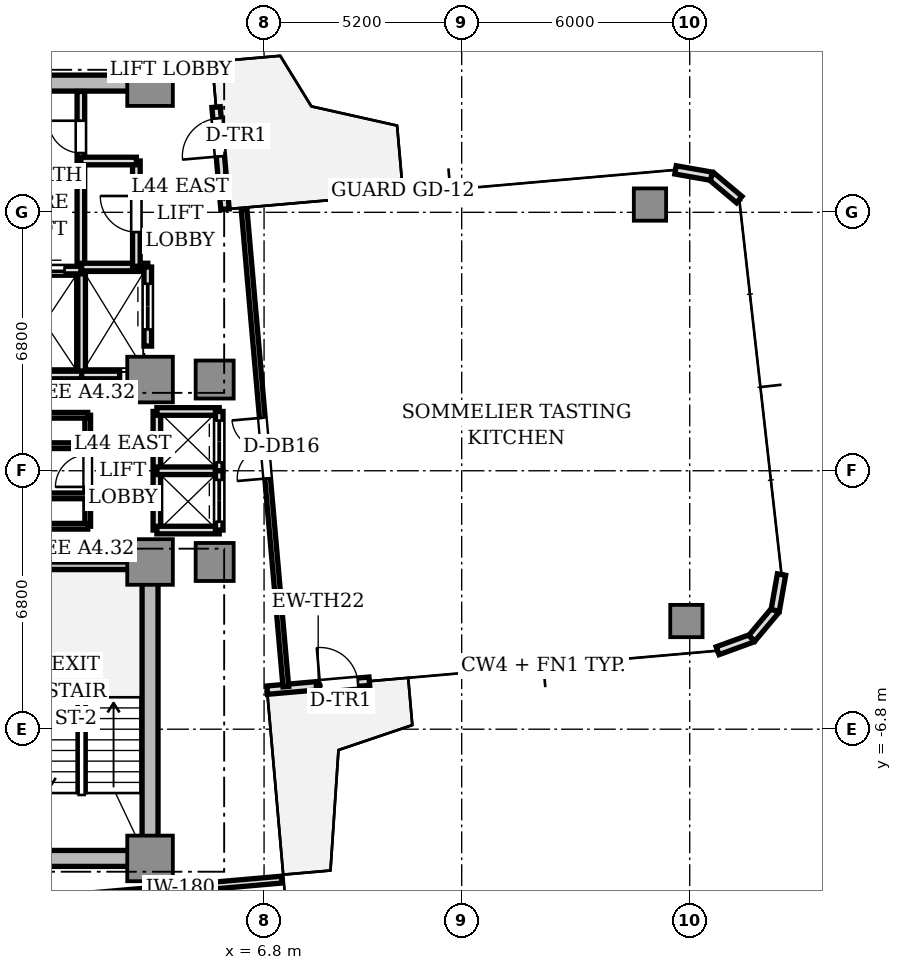
"""IFC4 building model, lengths in metres.
Left out: names, types, materials, properties, quantities, classifications, styles, units other than length and angle.
Written with IfcOpenShell. Run it as: python <this file> out.ifc"""

import sys

from ifc_helpers import new_model, si_unit, direction, frame, frame_2d, origin, origin_2d, place, context, subcontext, project, spatial, rectangle, extrude, source, transform, mapped, element, fill, save


model = new_model("IFC4")
c1 = context("Model", 3, precision=1e-05, world=origin(), true_north=direction((0.0, 1.0)))
c2 = subcontext(c1, "Body", "Model", "MODEL_VIEW")
j1 = project(units=[si_unit("LENGTHUNIT", "METRE"), si_unit("PLANEANGLEUNIT", "RADIAN")], contexts=[c1])
p1 = place(None, origin())
s1 = spatial("IfcSite", under=j1, at=p1, CompositionType="ELEMENT")
p2 = place(p1, origin())
s2 = spatial("IfcBuilding", under=s1, at=p2, CompositionType="ELEMENT")
p3 = place(p2, frame((0.0, 0.0, 160.65)))
s3 = spatial("IfcBuildingStorey", under=s2, at=p3, CompositionType="ELEMENT", Elevation=160.65)
for number, where, z_axis, x_axis in (
    (1, (-3.55, 10.2, 0.0), (0.0, 0.0, 1.0), (1.0, 0.0, 0.0)),
    (2, (-3.55, -10.2, 0.0), (0.0, 0.0, 1.0), (1.0, 0.0, 0.0)),
):
    element("IfcWall", number, at=place(p3, frame(where, z_axis=z_axis, x_axis=x_axis)), inside=s3, PredefinedType="SHEAR", context=c2, shape_type="SweptSolid", body=[
        extrude(rectangle(XDim=7.1, YDim=0.42, at=frame_2d((3.55, 0.0))), origin(), (0.0, 0.0, 1.0), 3.11),
    ])
p4 = place(p3, frame((3.8, -9.75, 0.0), z_axis=(0.0, 0.0, 1.0), x_axis=(0.0, 1.0, 0.0)))
e3 = element("IfcWall", 3, at=p4, inside=s3, PredefinedType="SHEAR", context=c2, shape_type="SweptSolid", body=[
    extrude(rectangle(XDim=6.9, YDim=0.42, at=frame_2d((3.45, 0.0))), origin(), (0.0, 0.0, 1.0), 3.11),
])
m1 = source(origin(), c2, "Body", "SweptSolid", [
    extrude(rectangle(XDim=1.2, YDim=1.2, at=origin_2d()), origin(), (0.0, 0.0, 1.0), 3.11),
])
for number, where, z_axis, x_axis in (
    (4, (3.8, 2.4, 0.0), (0.0, 0.0, 1.0), (1.0, 0.0, 0.0)),
    (5, (3.8, 10.2, 0.0), (0.0, 0.0, 1.0), (1.0, 0.0, 0.0)),
    (6, (3.8, -2.4, 0.0), (0.0, 0.0, 1.0), (1.0, 0.0, 0.0)),
    (7, (3.8, -10.2, 0.0), (0.0, 0.0, 1.0), (1.0, 0.0, 0.0)),
):
    element("IfcColumn", number, at=place(p3, frame(where, z_axis=z_axis, x_axis=x_axis)), inside=s3, PredefinedType="COLUMN", context=c2, shape_type="MappedRepresentation", body=[
        mapped(m1, transform((0.0, 0.0, 0.0), scale=1.0)),
    ])
m2 = source(origin(), c2, "Body", "SweptSolid", [
    extrude(rectangle(XDim=1.0, YDim=1.0, at=origin_2d()), origin(), (0.0, 0.0, 1.0), 3.11),
])
for number, where, z_axis, x_axis in (
    (8, (5.5, 2.4, 0.0), (0.0, 0.0, 1.0), (1.0, 0.0, 0.0)),
    (9, (5.5, -2.4, 0.0), (0.0, 0.0, 1.0), (1.0, 0.0, 0.0)),
):
    element("IfcColumn", number, at=place(p3, frame(where, z_axis=z_axis, x_axis=x_axis)), inside=s3, PredefinedType="COLUMN", context=c2, shape_type="MappedRepresentation", body=[
        mapped(m2, transform((0.0, 0.0, 0.0), scale=1.0)),
    ])
m3 = source(origin(), c2, "Body", "SweptSolid", [
    extrude(rectangle(XDim=0.85, YDim=0.85, at=origin_2d()), origin(), (0.0, 0.0, 1.0), 3.11),
])
for number, where, z_axis, x_axis in (
    (10, (17.913, -3.954, 0.0), (0.0, 0.0, 1.0), (1.0, 0.0, 0.0)),
    (11, (16.954, 7.004, 0.0), (0.0, 0.0, 1.0), (1.0, 0.0, 0.0)),
):
    element("IfcColumn", number, at=place(p3, frame(where, z_axis=z_axis, x_axis=x_axis)), inside=s3, PredefinedType="COLUMN", context=c2, shape_type="MappedRepresentation", body=[
        mapped(m3, transform((0.0, 0.0, 0.0), scale=1.0)),
    ])
p5 = place(p3, frame((6.879, -5.772, 0.0), z_axis=(0.0, 0.0, 1.0), x_axis=(0.996193619346, 0.087168071984, 0.0)))
e12 = element("IfcWall", 12, at=p5, inside=s3, PredefinedType="STANDARD", context=c2, shape_type="SweptSolid", body=[
    extrude(rectangle(XDim=2.7, YDim=0.22, at=frame_2d((1.35, 0.0))), origin(), (0.0, 0.0, 1.0), 3.11),
])
p6 = place(p5, frame((1.4, 0.0, 0.0)))
e13 = element("IfcOpeningElement", 13, at=p6, cuts=e12, PredefinedType="OPENING", context=c2, shape_type="SweptSolid", body=[
    extrude(rectangle(XDim=1.0, YDim=2.2, at=frame_2d((0.5, 1.1))), frame((0.0, 0.12, 0.0), z_axis=(0.0, -1.0, 0.0), x_axis=(1.0, 0.0, 0.0)), (0.0, 0.0, 1.0), 0.24),
])
p7 = place(p3, frame((18.734, -4.735, 0.0), z_axis=(0.0, 0.0, 1.0), x_axis=(0.939741306239, 0.34188635151, 0.0)))
e14 = element("IfcWall", 14, at=p7, inside=s3, PredefinedType="STANDARD", context=c2, shape_type="SweptSolid", body=[
    extrude(rectangle(XDim=0.958, YDim=0.22, at=frame_2d((0.479, 0.0))), origin(), (0.0, 0.0, 1.0), 3.11),
])
for number, where, z_axis, x_axis in (
    (15, (19.634, -4.408, 0.0), (0.0, 0.0, 1.0), (0.643, 0.766, 0.0)),
    (16, (20.25, -3.674, 0.0), (0.0, 0.0, 1.0), (0.174, 0.985, 0.0)),
):
    element("IfcWall", number, at=place(p3, frame(where, z_axis=z_axis, x_axis=x_axis)), inside=s3, PredefinedType="STANDARD", context=c2, shape_type="SweptSolid", body=[
        extrude(rectangle(XDim=0.958, YDim=0.22, at=frame_2d((0.479, 0.0))), origin(), (0.0, 0.0, 1.0), 3.11),
    ])
p8 = place(p3, frame((19.304, 7.135, 0.0), z_axis=(0.0, 0.0, 1.0), x_axis=(-0.766001159887, 0.642839189107, 0.0)))
e17 = element("IfcWall", 17, at=p8, inside=s3, PredefinedType="STANDARD", context=c2, shape_type="SweptSolid", body=[
    extrude(rectangle(XDim=0.958, YDim=0.22, at=frame_2d((0.479, 0.0))), origin(), (0.0, 0.0, 1.0), 3.11),
])
p9 = place(p3, frame((18.57, 7.75, 0.0), z_axis=(0.0, 0.0, 1.0), x_axis=(-0.984770724397, 0.173858046606, 0.0)))
e18 = element("IfcWall", 18, at=p9, inside=s3, PredefinedType="STANDARD", context=c2, shape_type="SweptSolid", body=[
    extrude(rectangle(XDim=0.958, YDim=0.22, at=frame_2d((0.479, 0.0))), origin(), (0.0, 0.0, 1.0), 3.11),
])
p10 = place(p3, frame((5.772, 6.879, 0.0), z_axis=(0.0, 0.0, 1.0), x_axis=(-0.087168071984, 0.996193619346, 0.0)))
e19 = element("IfcWall", 19, at=p10, inside=s3, PredefinedType="STANDARD", context=c2, shape_type="SweptSolid", body=[
    extrude(rectangle(XDim=2.7, YDim=0.22, at=frame_2d((1.35, 0.0))), origin(), (0.0, 0.0, 1.0), 3.11),
])
p11 = place(p10, frame((1.4, 0.0, 0.0)))
e20 = element("IfcOpeningElement", 20, at=p11, cuts=e19, PredefinedType="OPENING", context=c2, shape_type="SweptSolid", body=[
    extrude(rectangle(XDim=1.0, YDim=2.2, at=frame_2d((0.5, 1.1))), frame((0.0, 0.12, 0.0), z_axis=(0.0, -1.0, 0.0), x_axis=(1.0, 0.0, 0.0)), (0.0, 0.0, 1.0), 0.24),
])
p12 = place(p3, frame((0.0, -2.5, 0.0), z_axis=(0.0, 0.0, 1.0), x_axis=(1.0, 0.0, 0.0)))
e21 = element("IfcWall", 21, at=p12, inside=s3, PredefinedType="SOLIDWALL", context=c2, shape_type="SweptSolid", body=[
    extrude(rectangle(XDim=3.72, YDim=0.2, at=frame_2d((1.86, 0.0))), origin(), (0.0, 0.0, 1.0), 3.11),
])
p13 = place(p3, frame((1.98, 5.32, 0.0), z_axis=(0.0, 0.0, 1.0), x_axis=(0.0, 1.0, 0.0)))
e22 = element("IfcWall", 22, at=p13, inside=s3, PredefinedType="SOLIDWALL", context=c2, shape_type="SweptSolid", body=[
    extrude(rectangle(XDim=4.66, YDim=0.2, at=frame_2d((2.33, 0.0))), origin(), (0.0, 0.0, 1.0), 2.66),
])
p14 = place(p13, frame((3.04, 0.0, 0.0)))
e23 = element("IfcOpeningElement", 23, at=p14, cuts=e22, PredefinedType="OPENING", context=c2, shape_type="SweptSolid", body=[
    extrude(rectangle(XDim=0.85, YDim=2.1, at=frame_2d((0.425, 1.05))), frame((0.0, 0.11, 0.0), z_axis=(0.0, -1.0, 0.0), x_axis=(1.0, 0.0, 0.0)), (0.0, 0.0, 1.0), 0.22),
])
p15 = place(p3, frame((2.0, 2.5, 0.0), z_axis=(0.0, 0.0, 1.0), x_axis=(0.0, 1.0, 0.0)))
e24 = element("IfcWall", 24, at=p15, inside=s3, PredefinedType="SOLIDWALL", context=c2, shape_type="SweptSolid", body=[
    extrude(rectangle(XDim=2.78, YDim=0.2, at=frame_2d((1.39, 0.0))), origin(), (0.0, 0.0, 1.0), 2.66),
])
p16 = place(p3, frame((0.05, 2.52, 0.0), z_axis=(0.0, 0.0, 1.0), x_axis=(1.0, 0.0, 0.0)))
e25 = element("IfcWall", 25, at=p16, inside=s3, PredefinedType="SOLIDWALL", context=c2, shape_type="SweptSolid", body=[
    extrude(rectangle(XDim=1.95, YDim=0.2, at=frame_2d((0.975, 0.0))), origin(), (0.0, 0.0, 1.0), 2.66),
])
p17 = place(p3, frame((0.05, 5.28, 0.0), z_axis=(0.0, 0.0, 1.0), x_axis=(1.0, 0.0, 0.0)))
e26 = element("IfcWall", 26, at=p17, inside=s3, PredefinedType="SOLIDWALL", context=c2, shape_type="SweptSolid", body=[
    extrude(rectangle(XDim=1.93, YDim=0.2, at=frame_2d((0.965, 0.0))), origin(), (0.0, 0.0, 1.0), 2.66),
])
p18 = place(p17, frame((0.4, 0.0, 0.0)))
e27 = element("IfcOpeningElement", 27, at=p18, cuts=e26, PredefinedType="OPENING", context=c2, shape_type="SweptSolid", body=[
    extrude(rectangle(XDim=1.1, YDim=2.2, at=frame_2d((0.55, 1.1))), frame((0.0, 0.11, 0.0), z_axis=(0.0, -1.0, 0.0), x_axis=(1.0, 0.0, 0.0)), (0.0, 0.0, 1.0), 0.22),
])
p19 = place(p3, frame((2.0, 2.52, 0.0), z_axis=(0.0, 0.0, 1.0), x_axis=(1.0, 0.0, 0.0)))
e28 = element("IfcWall", 28, at=p19, inside=s3, PredefinedType="SOLIDWALL", context=c2, shape_type="SweptSolid", body=[
    extrude(rectangle(XDim=1.0, YDim=0.2, at=frame_2d((0.5, 0.0))), origin(), (0.0, 0.0, 1.0), 2.66),
])
p20 = place(p3, frame((2.0, 5.36, 0.0), z_axis=(0.0, 0.0, 1.0), x_axis=(1.0, 0.0, 0.0)))
e29 = element("IfcWall", 29, at=p20, inside=s3, PredefinedType="SOLIDWALL", context=c2, shape_type="SweptSolid", body=[
    extrude(rectangle(XDim=1.74, YDim=0.2, at=frame_2d((0.87, 0.0))), origin(), (0.0, 0.0, 1.0), 2.66),
])
p21 = place(p3, frame((3.74, 3.28, 0.0), z_axis=(0.0, 0.0, 1.0), x_axis=(0.0, 1.0, 0.0)))
e30 = element("IfcWall", 30, at=p21, inside=s3, PredefinedType="SOLIDWALL", context=c2, shape_type="SweptSolid", body=[
    extrude(rectangle(XDim=2.08, YDim=0.2, at=frame_2d((1.04, 0.0))), origin(), (0.0, 0.0, 1.0), 2.66),
])
p22 = place(p21, frame((0.44, 0.0, 0.0)))
e31 = element("IfcOpeningElement", 31, at=p22, cuts=e30, PredefinedType="OPENING", context=c2, shape_type="SweptSolid", body=[
    extrude(rectangle(XDim=1.2, YDim=2.2, at=frame_2d((0.6, 1.1))), frame((0.0, 0.11, 0.0), z_axis=(0.0, -1.0, 0.0), x_axis=(1.0, 0.0, 0.0)), (0.0, 0.0, 1.0), 0.22),
])
p23 = place(p3, frame((3.98, -1.56, 0.0), z_axis=(0.0, 0.0, 1.0), x_axis=(0.0, 1.0, 0.0)))
e32 = element("IfcWall", 32, at=p23, inside=s3, PredefinedType="SOLIDWALL", context=c2, shape_type="SweptSolid", body=[
    extrude(rectangle(XDim=3.12, YDim=0.2, at=frame_2d((1.56, 0.0))), origin(), (0.0, 0.0, 1.0), 2.28),
])
for number, where, z_axis, x_axis in (
    (33, (3.98, 1.56, 0.0), (0.0, 0.0, 1.0), (1.0, 0.0, 0.0)),
    (34, (3.98, -1.56, 0.0), (0.0, 0.0, 1.0), (1.0, 0.0, 0.0)),
    (35, (3.98, 0.0, 0.0), (0.0, 0.0, 1.0), (1.0, 0.0, 0.0)),
):
    element("IfcWall", number, at=place(p3, frame(where, z_axis=z_axis, x_axis=x_axis)), inside=s3, PredefinedType="SOLIDWALL", context=c2, shape_type="SweptSolid", body=[
        extrude(rectangle(XDim=1.64, YDim=0.2, at=frame_2d((0.82, 0.0))), origin(), (0.0, 0.0, 1.0), 2.66),
    ])
p24 = place(p3, frame((5.62, 0.0, 0.0), z_axis=(0.0, 0.0, 1.0), x_axis=(0.0, 1.0, 0.0)))
e36 = element("IfcWall", 36, at=p24, inside=s3, PredefinedType="SOLIDWALL", context=c2, shape_type="SweptSolid", body=[
    extrude(rectangle(XDim=1.56, YDim=0.2, at=frame_2d((0.78, 0.0))), origin(), (0.0, 0.0, 1.0), 2.66),
])
p25 = place(p24, frame((0.22, 0.0, 0.0)))
e37 = element("IfcOpeningElement", 37, at=p25, cuts=e36, PredefinedType="OPENING", context=c2, shape_type="SweptSolid", body=[
    extrude(rectangle(XDim=1.1, YDim=2.2, at=frame_2d((0.55, 1.1))), frame((0.0, 0.11, 0.0), z_axis=(0.0, -1.0, 0.0), x_axis=(1.0, 0.0, 0.0)), (0.0, 0.0, 1.0), 0.22),
])
p26 = place(p3, frame((5.62, -1.56, 0.0), z_axis=(0.0, 0.0, 1.0), x_axis=(0.0, 1.0, 0.0)))
e38 = element("IfcWall", 38, at=p26, inside=s3, PredefinedType="SOLIDWALL", context=c2, shape_type="SweptSolid", body=[
    extrude(rectangle(XDim=1.56, YDim=0.2, at=frame_2d((0.78, 0.0))), origin(), (0.0, 0.0, 1.0), 2.66),
])
p27 = place(p26, frame((0.22, 0.0, 0.0)))
e39 = element("IfcOpeningElement", 39, at=p27, cuts=e38, PredefinedType="OPENING", context=c2, shape_type="SweptSolid", body=[
    extrude(rectangle(XDim=1.1, YDim=2.2, at=frame_2d((0.55, 1.1))), frame((0.0, 0.11, 0.0), z_axis=(0.0, -1.0, 0.0), x_axis=(1.0, 0.0, 0.0)), (0.0, 0.0, 1.0), 0.22),
])
p28 = place(p3, frame((3.44, 5.38, 0.0), z_axis=(0.0, 0.0, 1.0), x_axis=(0.0, 1.0, 0.0)))
e40 = element("IfcWall", 40, at=p28, inside=s3, PredefinedType="SOLIDWALL", context=c2, shape_type="SweptSolid", body=[
    extrude(rectangle(XDim=2.77, YDim=0.2, at=frame_2d((1.385, 0.0))), origin(), (0.0, 0.0, 1.0), 2.66),
])
p29 = place(p28, frame((0.9, 0.0, 0.0)))
e41 = element("IfcOpeningElement", 41, at=p29, cuts=e40, PredefinedType="OPENING", context=c2, shape_type="SweptSolid", body=[
    extrude(rectangle(XDim=0.95, YDim=2.15, at=frame_2d((0.475, 1.075))), frame((0.0, 0.11, 0.0), z_axis=(0.0, -1.0, 0.0), x_axis=(1.0, 0.0, 0.0)), (0.0, 0.0, 1.0), 0.22),
])
p30 = place(p3, frame((1.98, 8.15, 0.0), z_axis=(0.0, 0.0, 1.0), x_axis=(1.0, 0.0, 0.0)))
e42 = element("IfcWall", 42, at=p30, inside=s3, PredefinedType="SOLIDWALL", context=c2, shape_type="SweptSolid", body=[
    extrude(rectangle(XDim=1.46, YDim=0.2, at=frame_2d((0.73, 0.0))), origin(), (0.0, 0.0, 1.0), 2.66),
])
p31 = place(p3, frame((2.16, -1.46, 0.0), z_axis=(0.0, 0.0, 1.0), x_axis=(0.0, 1.0, 0.0)))
e43 = element("IfcWall", 43, at=p31, inside=s3, PredefinedType="PARTITIONING", context=c2, shape_type="SweptSolid", body=[
    extrude(rectangle(XDim=2.92, YDim=0.15, at=frame_2d((1.46, 0.0))), origin(), (0.0, 0.0, 1.0), 2.66),
])
p32 = place(p31, frame((1.035, 0.0, 0.0)))
e44 = element("IfcOpeningElement", 44, at=p32, cuts=e43, PredefinedType="OPENING", context=c2, shape_type="SweptSolid", body=[
    extrude(rectangle(XDim=0.85, YDim=2.1, at=frame_2d((0.425, 1.05))), frame((0.0, 0.085, 0.0), z_axis=(0.0, -1.0, 0.0), x_axis=(1.0, 0.0, 0.0)), (0.0, 0.0, 1.0), 0.17),
])
p33 = place(p3, frame((-2.16, 1.46, 0.0), z_axis=(0.0, 0.0, 1.0), x_axis=(1.0, 0.0, 0.0)))
e45 = element("IfcWall", 45, at=p33, inside=s3, PredefinedType="PARTITIONING", context=c2, shape_type="SweptSolid", body=[
    extrude(rectangle(XDim=4.32, YDim=0.15, at=frame_2d((2.16, 0.0))), origin(), (0.0, 0.0, 1.0), 2.66),
])
p34 = place(p33, frame((1.73, 0.0, 0.0)))
e46 = element("IfcOpeningElement", 46, at=p34, cuts=e45, PredefinedType="OPENING", context=c2, shape_type="SweptSolid", body=[
    extrude(rectangle(XDim=0.85, YDim=2.1, at=frame_2d((0.425, 1.05))), frame((0.0, 0.085, 0.0), z_axis=(0.0, -1.0, 0.0), x_axis=(1.0, 0.0, 0.0)), (0.0, 0.0, 1.0), 0.17),
])
p35 = place(p3, frame((-2.16, -1.46, 0.0), z_axis=(0.0, 0.0, 1.0), x_axis=(1.0, 0.0, 0.0)))
e47 = element("IfcWall", 47, at=p35, inside=s3, PredefinedType="PARTITIONING", context=c2, shape_type="SweptSolid", body=[
    extrude(rectangle(XDim=4.32, YDim=0.15, at=frame_2d((2.16, 0.0))), origin(), (0.0, 0.0, 1.0), 2.66),
])
p36 = place(p35, frame((1.73, 0.0, 0.0)))
e48 = element("IfcOpeningElement", 48, at=p36, cuts=e47, PredefinedType="OPENING", context=c2, shape_type="SweptSolid", body=[
    extrude(rectangle(XDim=0.85, YDim=2.1, at=frame_2d((0.425, 1.05))), frame((0.0, 0.085, 0.0), z_axis=(0.0, -1.0, 0.0), x_axis=(1.0, 0.0, 0.0)), (0.0, 0.0, 1.0), 0.17),
])
for number, where, z_axis, x_axis in (
    (49, (-2.16, 0.66, 0.0), (0.0, 0.0, 1.0), (1.0, 0.0, 0.0)),
    (50, (-2.16, -0.66, 0.0), (0.0, 0.0, 1.0), (1.0, 0.0, 0.0)),
):
    element("IfcWall", number, at=place(p3, frame(where, z_axis=z_axis, x_axis=x_axis)), inside=s3, PredefinedType="PARTITIONING", context=c2, shape_type="SweptSolid", body=[
        extrude(rectangle(XDim=4.32, YDim=0.15, at=frame_2d((2.16, 0.0))), origin(), (0.0, 0.0, 1.0), 2.66),
    ])
p37 = place(p3, frame((7.373, -5.679, 0.0), z_axis=(0.0, 0.0, 1.0), x_axis=(-0.087154691724, 0.996194790044, 0.0)))
e51 = element("IfcWall", 51, at=p37, inside=s3, PredefinedType="PARTITIONING", context=c2, shape_type="SweptSolid", body=[
    extrude(rectangle(XDim=12.6, YDim=0.15, at=frame_2d((6.3, 0.0))), origin(), (0.0, 0.0, 1.0), 2.66),
])
p38 = place(p37, frame((5.5, 0.0, 0.0)))
e52 = element("IfcOpeningElement", 52, at=p38, cuts=e51, PredefinedType="OPENING", context=c2, shape_type="SweptSolid", body=[
    extrude(rectangle(XDim=1.6, YDim=2.25, at=frame_2d((0.8, 1.125))), frame((0.0, 0.085, 0.0), z_axis=(0.0, -1.0, 0.0), x_axis=(1.0, 0.0, 0.0)), (0.0, 0.0, 1.0), 0.17),
])
p39 = place(p3, frame((5.287, 11.856, 0.0), z_axis=(0.0, 0.0, 1.0), x_axis=(-0.996194790044, -0.087154691724, 0.0)))
e53 = element("IfcWall", 53, at=p39, inside=s3, PredefinedType="PARTITIONING", context=c2, shape_type="SweptSolid", body=[
    extrude(rectangle(XDim=12.6, YDim=0.15, at=frame_2d((6.3, 0.0))), origin(), (0.0, 0.0, 1.0), 2.66),
])
p40 = place(p39, frame((5.5, 0.0, 0.0)))
e54 = element("IfcOpeningElement", 54, at=p40, cuts=e53, PredefinedType="OPENING", context=c2, shape_type="SweptSolid", body=[
    extrude(rectangle(XDim=1.6, YDim=2.25, at=frame_2d((0.8, 1.125))), frame((0.0, 0.085, 0.0), z_axis=(0.0, -1.0, 0.0), x_axis=(1.0, 0.0, 0.0)), (0.0, 0.0, 1.0), 0.17),
])
p41 = place(p3, frame((1.936, -11.224, 0.0), z_axis=(0.0, 0.0, 1.0), x_axis=(0.996194212812, 0.087161289348, 0.0)))
e55 = element("IfcWall", 55, at=p41, inside=s3, PredefinedType="PARTITIONING", context=c2, shape_type="SweptSolid", body=[
    extrude(rectangle(XDim=5.35, YDim=0.18, at=frame_2d((2.675, 0.0))), origin(), (0.0, 0.0, 1.0), 2.66),
])
m4 = source(origin(), c2, "Body", "SweptSolid", [
    extrude(rectangle(XDim=1.0, YDim=0.05, at=origin_2d()), origin(), (0.0, 0.0, 1.0), 2.2),
])
p42 = place(p6, frame((0.5, 0.0, 0.0)))
e56 = element("IfcDoor", 56, at=p42, inside=s3, OperationType="SINGLE_SWING_LEFT", PredefinedType="DOOR", context=c2, shape_type="MappedRepresentation", body=[
    mapped(m4, transform((0.0, 0.0, 0.0), scale=1.0)),
])
fill(e13, e56)
p43 = place(p11, frame((0.5, 0.0, 0.0)))
e57 = element("IfcDoor", 57, at=p43, inside=s3, OperationType="SINGLE_SWING_LEFT", PredefinedType="DOOR", context=c2, shape_type="MappedRepresentation", body=[
    mapped(m4, transform((0.0, 0.0, 0.0), scale=1.0)),
])
fill(e20, e57)
m5 = source(origin(), c2, "Body", "SweptSolid", [
    extrude(rectangle(XDim=0.85, YDim=0.05, at=origin_2d()), origin(), (0.0, 0.0, 1.0), 2.1),
])
p44 = place(p14, frame((0.425, 0.0, 0.0)))
e58 = element("IfcDoor", 58, at=p44, inside=s3, OperationType="SINGLE_SWING_RIGHT", PredefinedType="DOOR", context=c2, shape_type="MappedRepresentation", body=[
    mapped(m5, transform((0.0, 0.0, 0.0), scale=1.0)),
])
fill(e23, e58)
m6 = source(origin(), c2, "Body", "SweptSolid", [
    extrude(rectangle(XDim=1.1, YDim=0.05, at=origin_2d()), origin(), (0.0, 0.0, 1.0), 2.2),
])
p45 = place(p18, frame((0.55, 0.0, 0.0)))
e59 = element("IfcDoor", 59, at=p45, inside=s3, OperationType="DOUBLE_DOOR_SLIDING", PredefinedType="DOOR", context=c2, shape_type="MappedRepresentation", body=[
    mapped(m6, transform((0.0, 0.0, 0.0), scale=1.0)),
])
fill(e27, e59)
m7 = source(origin(), c2, "Body", "SweptSolid", [
    extrude(rectangle(XDim=1.2, YDim=0.05, at=origin_2d()), origin(), (0.0, 0.0, 1.0), 2.2),
])
p46 = place(p22, frame((0.6, 0.0, 0.0)))
e60 = element("IfcDoor", 60, at=p46, inside=s3, OperationType="DOUBLE_DOOR_SLIDING", PredefinedType="DOOR", context=c2, shape_type="MappedRepresentation", body=[
    mapped(m7, transform((0.0, 0.0, 0.0), scale=1.0)),
])
fill(e31, e60)
p47 = place(p25, frame((0.55, 0.0, 0.0)))
e61 = element("IfcDoor", 61, at=p47, inside=s3, OperationType="DOUBLE_DOOR_SLIDING", PredefinedType="DOOR", context=c2, shape_type="MappedRepresentation", body=[
    mapped(m6, transform((0.0, 0.0, 0.0), scale=1.0)),
])
fill(e37, e61)
p48 = place(p27, frame((0.55, 0.0, 0.0)))
e62 = element("IfcDoor", 62, at=p48, inside=s3, OperationType="DOUBLE_DOOR_SLIDING", PredefinedType="DOOR", context=c2, shape_type="MappedRepresentation", body=[
    mapped(m6, transform((0.0, 0.0, 0.0), scale=1.0)),
])
fill(e39, e62)
m8 = source(origin(), c2, "Body", "SweptSolid", [
    extrude(rectangle(XDim=0.95, YDim=0.05, at=origin_2d()), origin(), (0.0, 0.0, 1.0), 2.15),
])
p49 = place(p29, frame((0.475, 0.0, 0.0)))
e63 = element("IfcDoor", 63, at=p49, inside=s3, OperationType="SINGLE_SWING_RIGHT", PredefinedType="DOOR", context=c2, shape_type="MappedRepresentation", body=[
    mapped(m8, transform((0.0, 0.0, 0.0), scale=1.0)),
])
fill(e41, e63)
p50 = place(p32, frame((0.425, 0.0, 0.0)))
e64 = element("IfcDoor", 64, at=p50, inside=s3, OperationType="SINGLE_SWING_LEFT", PredefinedType="DOOR", context=c2, shape_type="MappedRepresentation", body=[
    mapped(m5, transform((0.0, 0.0, 0.0), scale=1.0)),
])
fill(e44, e64)
m9 = source(origin(), c2, "Body", "SweptSolid", [
    extrude(rectangle(XDim=1.6, YDim=0.05, at=origin_2d()), origin(), (0.0, 0.0, 1.0), 2.25),
])
p51 = place(p38, frame((0.8, 0.0, 0.0)))
e65 = element("IfcDoor", 65, at=p51, inside=s3, OperationType="DOUBLE_DOOR_SINGLE_SWING", PredefinedType="DOOR", context=c2, shape_type="MappedRepresentation", body=[
    mapped(m9, transform((0.0, 0.0, 0.0), scale=1.0)),
])
fill(e52, e65)
save(model, sys.argv[1])
